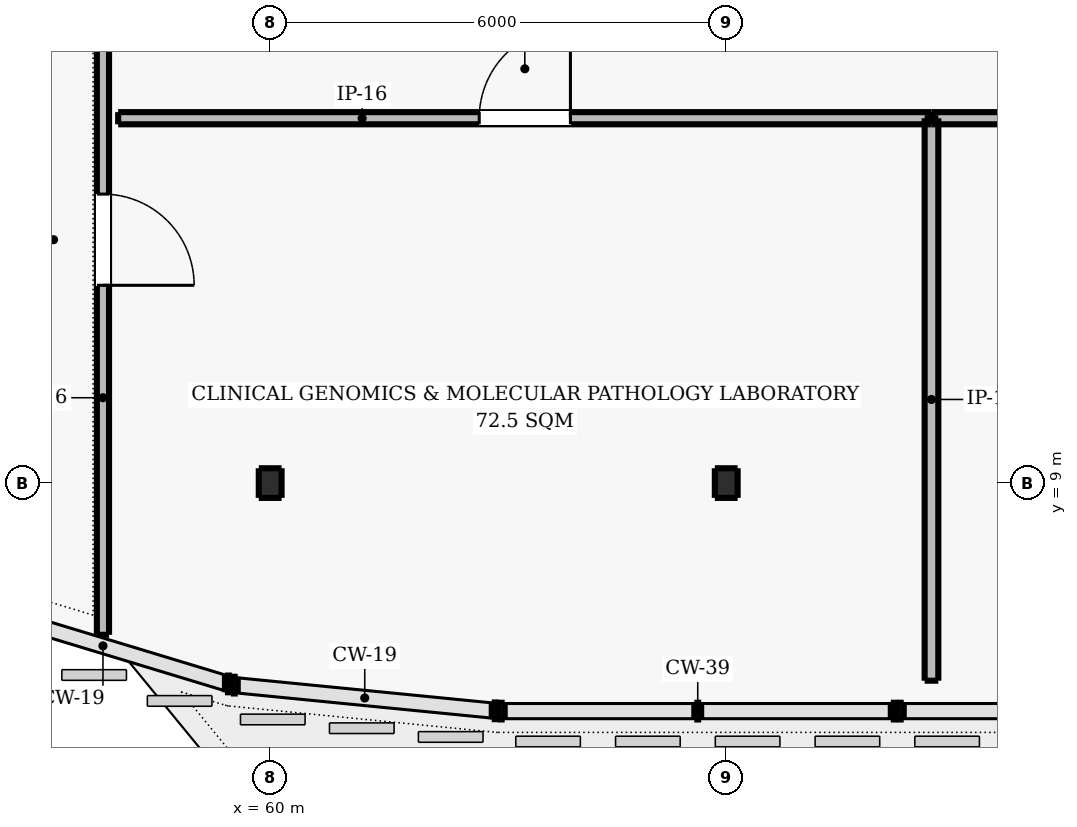
"""IFC4 building model, lengths in metres.
Left out: names, types, materials, properties, quantities, classifications, styles, units other than length and angle.
Written with IfcOpenShell. Run it as: python <this file> out.ifc"""

import sys

from ifc_helpers import new_model, si_unit, direction, frame, frame_2d, origin, origin_2d, place, context, subcontext, project, spatial, rectangle, i_section, extrude, element, fill, save


model = new_model("IFC4")
c1 = context("Model", 3, precision=1e-05, world=origin(), true_north=direction((0.0, 1.0)))
c2 = subcontext(c1, "Body", "Model", "MODEL_VIEW")
j1 = project(units=[si_unit("LENGTHUNIT", "METRE"), si_unit("PLANEANGLEUNIT", "RADIAN")], contexts=[c1])
p1 = place(None, origin())
s1 = spatial("IfcSite", under=j1, at=p1, CompositionType="ELEMENT")
p2 = place(p1, origin())
s2 = spatial("IfcBuilding", under=s1, at=p2, CompositionType="ELEMENT")
p3 = place(p2, frame((0.0, 0.0, 22.2)))
s3 = spatial("IfcBuildingStorey", under=s2, at=p3, CompositionType="ELEMENT", Elevation=22.2)
for number, where, z_axis, x_axis in (
    (1, (60.0, 9.0, 0.0), (0.0, 0.0, 1.0), (1.0, 0.0, 0.0)),
    (2, (66.0, 9.0, 0.0), (0.0, 0.0, 1.0), (1.0, 0.0, 0.0)),
):
    element("IfcColumn", number, at=place(p3, frame(where, z_axis=z_axis, x_axis=x_axis)), inside=s3, PredefinedType="COLUMN", context=c2, shape_type="SweptSolid", body=[
        extrude(i_section(OverallWidth=0.3, OverallDepth=0.39, WebThickness=0.011, FlangeThickness=0.019, FilletRadius=0.027, at=origin_2d()), origin(), (0.0, 0.0, 1.0), 4.2),
    ])
p4 = place(p3, frame((57.8, 7.004, 0.0), z_axis=(0.0, 0.0, 1.0), x_axis=(0.0, 1.0, 0.0)))
e3 = element("IfcWall", 3, at=p4, inside=s3, PredefinedType="PARTITIONING", context=c2, shape_type="SweptSolid", body=[
    extrude(rectangle(XDim=10.396, YDim=0.16, at=frame_2d((5.198, 0.0))), origin(), (0.0, 0.0, 1.0), 3.94),
])
p5 = place(p4, frame((4.598, 0.0, 0.0)))
e4 = element("IfcOpeningElement", 4, at=p5, cuts=e3, PredefinedType="OPENING", context=c2, shape_type="SweptSolid", body=[
    extrude(rectangle(XDim=1.2, YDim=2.2, at=frame_2d((0.6, 1.1))), frame((0.0, 0.09, 0.0), z_axis=(0.0, -1.0, 0.0), x_axis=(1.0, 0.0, 0.0)), (0.0, 0.0, 1.0), 0.18),
])
p6 = place(p3, frame((58.0, 13.8, 0.0), z_axis=(0.0, 0.0, 1.0), x_axis=(1.0, 0.0, 0.0)))
e5 = element("IfcWall", 5, at=p6, inside=s3, PredefinedType="PARTITIONING", context=c2, shape_type="SweptSolid", body=[
    extrude(rectangle(XDim=10.7, YDim=0.16, at=frame_2d((5.35, 0.0))), origin(), (0.0, 0.0, 1.0), 3.94),
])
p7 = place(p6, frame((4.75, 0.0, 0.0)))
e6 = element("IfcOpeningElement", 6, at=p7, cuts=e5, PredefinedType="OPENING", context=c2, shape_type="SweptSolid", body=[
    extrude(rectangle(XDim=1.2, YDim=2.2, at=frame_2d((0.6, 1.1))), frame((0.0, 0.09, 0.0), z_axis=(0.0, -1.0, 0.0), x_axis=(1.0, 0.0, 0.0)), (0.0, 0.0, 1.0), 0.18),
])
p8 = place(p3, frame((68.7, 6.4, 0.0), z_axis=(0.0, 0.0, 1.0), x_axis=(0.0, 1.0, 0.0)))
e7 = element("IfcWall", 7, at=p8, inside=s3, PredefinedType="PARTITIONING", context=c2, shape_type="SweptSolid", body=[
    extrude(rectangle(XDim=7.4, YDim=0.18, at=frame_2d((3.7, 0.0))), origin(), (0.0, 0.0, 1.0), 3.62),
])
p9 = place(p3, frame((68.7, 13.8, 0.0), z_axis=(0.0, 0.0, 1.0), x_axis=(1.0, 0.0, 0.0)))
e8 = element("IfcWall", 8, at=p9, inside=s3, PredefinedType="PARTITIONING", context=c2, shape_type="SweptSolid", body=[
    extrude(rectangle(XDim=10.7, YDim=0.16, at=frame_2d((5.35, 0.0))), origin(), (0.0, 0.0, 1.0), 3.94),
])
p10 = place(p9, frame((4.75, 0.0, 0.0)))
e9 = element("IfcOpeningElement", 9, at=p10, cuts=e8, PredefinedType="OPENING", context=c2, shape_type="SweptSolid", body=[
    extrude(rectangle(XDim=1.2, YDim=2.2, at=frame_2d((0.6, 1.1))), frame((0.0, 0.09, 0.0), z_axis=(0.0, -1.0, 0.0), x_axis=(1.0, 0.0, 0.0)), (0.0, 0.0, 1.0), 0.18),
])
p11 = place(p5, frame((1.2, 0.0, 0.0), z_axis=(0.0, 0.0, 1.0), x_axis=(-1.0, 0.0, 0.0)))
e10 = element("IfcDoor", 10, at=p11, inside=s3, OperationType="SINGLE_SWING_LEFT", PredefinedType="DOOR", context=c2, shape_type="SweptSolid", body=[
    extrude(rectangle(XDim=1.2, YDim=2.2, at=frame_2d((0.6, 1.1))), frame((0.0, 0.025, 0.0), z_axis=(0.0, -1.0, 0.0), x_axis=(1.0, 0.0, 0.0)), (0.0, 0.0, 1.0), 0.05),
])
fill(e4, e10)
p12 = place(p7, origin())
e11 = element("IfcDoor", 11, at=p12, inside=s3, OperationType="SINGLE_SWING_RIGHT", PredefinedType="DOOR", context=c2, shape_type="SweptSolid", body=[
    extrude(rectangle(XDim=1.2, YDim=2.2, at=frame_2d((0.6, 1.1))), frame((0.0, 0.025, 0.0), z_axis=(0.0, -1.0, 0.0), x_axis=(1.0, 0.0, 0.0)), (0.0, 0.0, 1.0), 0.05),
])
fill(e6, e11)
save(model, sys.argv[1])
